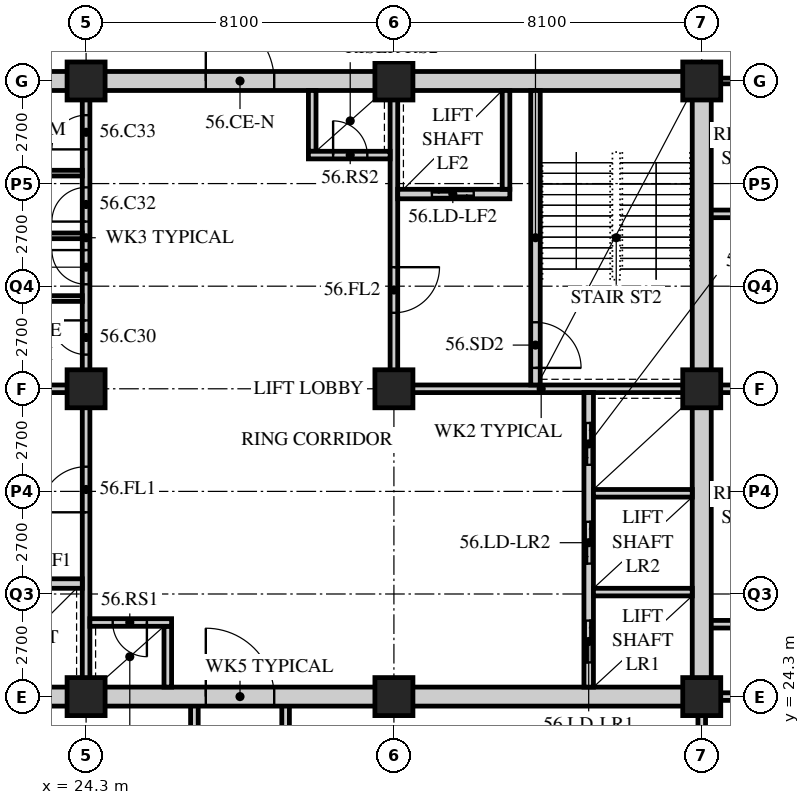
"""IFC4 building model, lengths in metres.
Left out: names, types, materials, properties, quantities, classifications, styles, units other than length and angle.
Written with IfcOpenShell. Run it as: python <this file> out.ifc"""

import sys

from ifc_helpers import new_model, si_unit, direction, frame, frame_2d, origin, origin_2d, place, context, subcontext, project, spatial, rectangle, hollow_rectangle, extrude, element, fill, save


model = new_model("IFC4")
c1 = context("Model", 3, precision=1e-05, world=origin(), true_north=direction((0.0, 1.0)))
c2 = subcontext(c1, "Body", "Model", "MODEL_VIEW")
j1 = project(units=[si_unit("LENGTHUNIT", "METRE"), si_unit("PLANEANGLEUNIT", "RADIAN")], contexts=[c1])
p1 = place(None, origin())
s1 = spatial("IfcSite", under=j1, at=p1, CompositionType="ELEMENT")
p2 = place(p1, origin())
s2 = spatial("IfcBuilding", under=s1, at=p2, CompositionType="ELEMENT")
p3 = place(p2, frame((0.0, 0.0, 217.2)))
s3 = spatial("IfcBuildingStorey", under=s2, at=p3, CompositionType="ELEMENT", Elevation=217.2)
for number, where, z_axis, x_axis in (
    (1, (24.3, 24.3, 0.0), (0.0, 0.0, 1.0), (1.0, 0.0, 0.0)),
    (2, (24.3, 32.4, 0.0), (0.0, 0.0, 1.0), (1.0, 0.0, 0.0)),
    (3, (24.3, 40.5, 0.0), (0.0, 0.0, 1.0), (1.0, 0.0, 0.0)),
    (4, (32.4, 24.3, 0.0), (0.0, 0.0, 1.0), (1.0, 0.0, 0.0)),
    (5, (32.4, 32.4, 0.0), (0.0, 0.0, 1.0), (1.0, 0.0, 0.0)),
    (6, (32.4, 40.5, 0.0), (0.0, 0.0, 1.0), (1.0, 0.0, 0.0)),
    (7, (40.5, 24.3, 0.0), (0.0, 0.0, 1.0), (1.0, 0.0, 0.0)),
    (8, (40.5, 32.4, 0.0), (0.0, 0.0, 1.0), (1.0, 0.0, 0.0)),
    (9, (40.5, 40.5, 0.0), (0.0, 0.0, 1.0), (1.0, 0.0, 0.0)),
):
    element("IfcColumn", number, at=place(p3, frame(where, z_axis=z_axis, x_axis=x_axis)), inside=s3, PredefinedType="COLUMN", context=c2, shape_type="SweptSolid", body=[
        extrude(hollow_rectangle(XDim=1.0, YDim=1.0, WallThickness=0.1, at=origin_2d()), origin(), (0.0, 0.0, 1.0), 3.6),
    ])
p4 = place(p3, frame((46.8, 40.5, 0.0), z_axis=(0.0, 0.0, 1.0), x_axis=(-1.0, 0.0, 0.0)))
e10 = element("IfcWall", 10, at=p4, inside=s3, PredefinedType="PARTITIONING", context=c2, shape_type="SweptSolid", body=[
    extrude(rectangle(XDim=6.1, YDim=0.15, at=frame_2d((3.05, 0.0))), origin(), (0.0, 0.0, 1.0), 3.39),
])
for number, where, z_axis, x_axis in (
    (11, (40.5, 32.4, 0.0), (0.0, 0.0, 1.0), (1.0, 0.0, 0.0)),
    (12, (46.8, 26.205, 0.0), (0.0, 0.0, 1.0), (-1.0, 0.0, 0.0)),
    (13, (46.8, 37.003, 0.0), (0.0, 0.0, 1.0), (-1.0, 0.0, 0.0)),
):
    element("IfcWall", number, at=place(p3, frame(where, z_axis=z_axis, x_axis=x_axis)), inside=s3, PredefinedType="SOLIDWALL", context=c2, shape_type="SweptSolid", body=[
        extrude(rectangle(XDim=6.3, YDim=0.2, at=frame_2d((3.15, 0.0))), origin(), (0.0, 0.0, 1.0), 3.39),
    ])
p5 = place(p3, frame((40.5, 20.7, 0.0), z_axis=(0.0, 0.0, 1.0), x_axis=(0.0, 1.0, 0.0)))
e14 = element("IfcWall", 14, at=p5, inside=s3, PredefinedType="SOLIDWALL", context=c2, shape_type="SweptSolid", body=[
    extrude(rectangle(XDim=3.6, YDim=0.2, at=frame_2d((1.8, 0.0))), origin(), (0.0, 0.0, 1.0), 2.778),
])
for number, where, z_axis, x_axis in (
    (15, (27.15, 20.7, 0.0), (0.0, 0.0, 1.0), (0.0, 1.0, 0.0)),
    (16, (29.55, 20.7, 0.0), (0.0, 0.0, 1.0), (0.0, 1.0, 0.0)),
):
    element("IfcWall", number, at=place(p3, frame(where, z_axis=z_axis, x_axis=x_axis)), inside=s3, PredefinedType="SOLIDWALL", context=c2, shape_type="SweptSolid", body=[
        extrude(rectangle(XDim=3.6, YDim=0.2, at=frame_2d((1.8, 0.0))), origin(), (0.0, 0.0, 1.0), 3.39),
    ])
p6 = place(p3, frame((40.5, 24.3, 0.0), z_axis=(0.0, 0.0, 1.0), x_axis=(1.0, 0.0, 0.0)))
e17 = element("IfcWall", 17, at=p6, inside=s3, PredefinedType="SOLIDWALL", context=c2, shape_type="SweptSolid", body=[
    extrude(rectangle(XDim=6.3, YDim=0.2, at=frame_2d((3.15, 0.0))), origin(), (0.0, 0.0, 1.0), 3.39),
])
p7 = place(p3, frame((15.95, 24.3, 0.0), z_axis=(0.0, 0.0, 1.0), x_axis=(1.0, 0.0, 0.0)))
e18 = element("IfcWall", 18, at=p7, inside=s3, PredefinedType="SOLIDWALL", context=c2, shape_type="SweptSolid", body=[
    extrude(rectangle(XDim=24.8, YDim=0.5, at=frame_2d((12.4, 0.0))), origin(), (0.0, 0.0, 1.0), 2.74),
])
p8 = place(p7, frame((11.5, 0.0, 0.0)))
e19 = element("IfcOpeningElement", 19, at=p8, cuts=e18, PredefinedType="OPENING", context=c2, shape_type="SweptSolid", body=[
    extrude(rectangle(XDim=1.8, YDim=2.4, at=frame_2d((0.9, 1.2))), frame((0.0, 0.26, 0.0), z_axis=(0.0, -1.0, 0.0), x_axis=(1.0, 0.0, 0.0)), (0.0, 0.0, 1.0), 0.52),
])
p9 = place(p3, frame((15.95, 40.5, 0.0), z_axis=(0.0, 0.0, 1.0), x_axis=(1.0, 0.0, 0.0)))
e20 = element("IfcWall", 20, at=p9, inside=s3, PredefinedType="SOLIDWALL", context=c2, shape_type="SweptSolid", body=[
    extrude(rectangle(XDim=24.8, YDim=0.5, at=frame_2d((12.4, 0.0))), origin(), (0.0, 0.0, 1.0), 2.74),
])
p10 = place(p9, frame((11.5, 0.0, 0.0)))
e21 = element("IfcOpeningElement", 21, at=p10, cuts=e20, PredefinedType="OPENING", context=c2, shape_type="SweptSolid", body=[
    extrude(rectangle(XDim=1.8, YDim=2.4, at=frame_2d((0.9, 1.2))), frame((0.0, 0.26, 0.0), z_axis=(0.0, -1.0, 0.0), x_axis=(1.0, 0.0, 0.0)), (0.0, 0.0, 1.0), 0.52),
])
p11 = place(p3, frame((40.5, 24.55, 0.0), z_axis=(0.0, 0.0, 1.0), x_axis=(0.0, 1.0, 0.0)))
e22 = element("IfcWall", 22, at=p11, inside=s3, PredefinedType="SOLIDWALL", context=c2, shape_type="SweptSolid", body=[
    extrude(rectangle(XDim=15.7, YDim=0.5, at=frame_2d((7.85, 0.0))), origin(), (0.0, 0.0, 1.0), 2.778),
])
p12 = place(p3, frame((16.45, 32.4, 0.0), z_axis=(0.0, 0.0, 1.0), x_axis=(1.0, 0.0, 0.0)))
e23 = element("IfcWall", 23, at=p12, inside=s3, PredefinedType="SOLIDWALL", context=c2, shape_type="SweptSolid", body=[
    extrude(rectangle(XDim=7.95, YDim=0.2, at=frame_2d((3.975, 0.0))), origin(), (0.0, 0.0, 1.0), 2.778),
])
p13 = place(p3, frame((24.3, 24.55, 0.0), z_axis=(0.0, 0.0, 1.0), x_axis=(0.0, 1.0, 0.0)))
e24 = element("IfcWall", 24, at=p13, inside=s3, PredefinedType="SOLIDWALL", context=c2, shape_type="SweptSolid", body=[
    extrude(rectangle(XDim=7.75, YDim=0.2, at=frame_2d((3.875, 0.0))), origin(), (0.0, 0.0, 1.0), 2.778),
])
p14 = place(p13, frame((4.6, 0.0, 0.0)))
e25 = element("IfcOpeningElement", 25, at=p14, cuts=e24, PredefinedType="OPENING", context=c2, shape_type="SweptSolid", body=[
    extrude(rectangle(XDim=1.2, YDim=2.1, at=frame_2d((0.6, 1.05))), frame((0.0, 0.11, 0.0), z_axis=(0.0, -1.0, 0.0), x_axis=(1.0, 0.0, 0.0)), (0.0, 0.0, 1.0), 0.22),
])
p15 = place(p3, frame((21.25, 27.275, 0.0), z_axis=(0.0, 0.0, 1.0), x_axis=(1.0, 0.0, 0.0)))
e26 = element("IfcWall", 26, at=p15, inside=s3, PredefinedType="SOLIDWALL", context=c2, shape_type="SweptSolid", body=[
    extrude(rectangle(XDim=2.95, YDim=0.25, at=frame_2d((1.475, 0.0))), origin(), (0.0, 0.0, 1.0), 3.39),
])
p16 = place(p15, frame((0.95, 0.0, 0.0)))
e27 = element("IfcOpeningElement", 27, at=p16, cuts=e26, PredefinedType="OPENING", context=c2, shape_type="SweptSolid", body=[
    extrude(rectangle(XDim=1.1, YDim=2.4, at=frame_2d((0.55, 1.2))), frame((0.0, 0.135, 0.0), z_axis=(0.0, -1.0, 0.0), x_axis=(1.0, 0.0, 0.0)), (0.0, 0.0, 1.0), 0.27),
])
p17 = place(p3, frame((26.45, 24.55, 0.0), z_axis=(0.0, 0.0, 1.0), x_axis=(0.0, 1.0, 0.0)))
e28 = element("IfcWall", 28, at=p17, inside=s3, PredefinedType="SOLIDWALL", context=c2, shape_type="SweptSolid", body=[
    extrude(rectangle(XDim=1.6, YDim=0.2, at=frame_2d((0.8, 0.0))), origin(), (0.0, 0.0, 1.0), 3.39),
])
p18 = place(p3, frame((24.4, 26.25, 0.0), z_axis=(0.0, 0.0, 1.0), x_axis=(1.0, 0.0, 0.0)))
e29 = element("IfcWall", 29, at=p18, inside=s3, PredefinedType="SOLIDWALL", context=c2, shape_type="SweptSolid", body=[
    extrude(rectangle(XDim=2.15, YDim=0.2, at=frame_2d((1.075, 0.0))), origin(), (0.0, 0.0, 1.0), 3.39),
])
p19 = place(p18, frame((0.6, 0.0, 0.0)))
e30 = element("IfcOpeningElement", 30, at=p19, cuts=e29, PredefinedType="OPENING", context=c2, shape_type="SweptSolid", body=[
    extrude(rectangle(XDim=0.9, YDim=2.1, at=frame_2d((0.45, 1.05))), frame((0.0, 0.11, 0.0), z_axis=(0.0, -1.0, 0.0), x_axis=(1.0, 0.0, 0.0)), (0.0, 0.0, 1.0), 0.22),
])
p20 = place(p3, frame((32.3, 32.4, 0.0), z_axis=(0.0, 0.0, 1.0), x_axis=(1.0, 0.0, 0.0)))
e31 = element("IfcWall", 31, at=p20, inside=s3, PredefinedType="SOLIDWALL", context=c2, shape_type="SweptSolid", body=[
    extrude(rectangle(XDim=7.95, YDim=0.2, at=frame_2d((3.975, 0.0))), origin(), (0.0, 0.0, 1.0), 2.778),
])
p21 = place(p3, frame((32.4, 32.5, 0.0), z_axis=(0.0, 0.0, 1.0), x_axis=(0.0, 1.0, 0.0)))
e32 = element("IfcWall", 32, at=p21, inside=s3, PredefinedType="SOLIDWALL", context=c2, shape_type="SweptSolid", body=[
    extrude(rectangle(XDim=7.75, YDim=0.2, at=frame_2d((3.875, 0.0))), origin(), (0.0, 0.0, 1.0), 2.778),
])
p22 = place(p21, frame((1.9, 0.0, 0.0)))
e33 = element("IfcOpeningElement", 33, at=p22, cuts=e32, PredefinedType="OPENING", context=c2, shape_type="SweptSolid", body=[
    extrude(rectangle(XDim=1.2, YDim=2.1, at=frame_2d((0.6, 1.05))), frame((0.0, 0.11, 0.0), z_axis=(0.0, -1.0, 0.0), x_axis=(1.0, 0.0, 0.0)), (0.0, 0.0, 1.0), 0.22),
])
p23 = place(p3, frame((37.525, 24.55, 0.0), z_axis=(0.0, 0.0, 1.0), x_axis=(0.0, 1.0, 0.0)))
e34 = element("IfcWall", 34, at=p23, inside=s3, PredefinedType="SOLIDWALL", context=c2, shape_type="SweptSolid", body=[
    extrude(rectangle(XDim=7.75, YDim=0.25, at=frame_2d((3.875, 0.0))), origin(), (0.0, 0.0, 1.0), 3.39),
])
p24 = place(p23, frame((0.65, 0.0, 0.0)))
e35 = element("IfcOpeningElement", 35, at=p24, cuts=e34, PredefinedType="OPENING", context=c2, shape_type="SweptSolid", body=[
    extrude(rectangle(XDim=1.1, YDim=2.4, at=frame_2d((0.55, 1.2))), frame((0.0, 0.135, 0.0), z_axis=(0.0, -1.0, 0.0), x_axis=(1.0, 0.0, 0.0)), (0.0, 0.0, 1.0), 0.27),
])
p25 = place(p23, frame((3.25, 0.0, 0.0)))
e36 = element("IfcOpeningElement", 36, at=p25, cuts=e34, PredefinedType="OPENING", context=c2, shape_type="SweptSolid", body=[
    extrude(rectangle(XDim=1.1, YDim=2.4, at=frame_2d((0.55, 1.2))), frame((0.0, 0.135, 0.0), z_axis=(0.0, -1.0, 0.0), x_axis=(1.0, 0.0, 0.0)), (0.0, 0.0, 1.0), 0.27),
])
p26 = place(p23, frame((5.85, 0.0, 0.0)))
e37 = element("IfcOpeningElement", 37, at=p26, cuts=e34, PredefinedType="OPENING", context=c2, shape_type="SweptSolid", body=[
    extrude(rectangle(XDim=1.1, YDim=2.4, at=frame_2d((0.55, 1.2))), frame((0.0, 0.135, 0.0), z_axis=(0.0, -1.0, 0.0), x_axis=(1.0, 0.0, 0.0)), (0.0, 0.0, 1.0), 0.27),
])
for number, where, z_axis, x_axis in (
    (38, (37.65, 27.05, 0.0), (0.0, 0.0, 1.0), (1.0, 0.0, 0.0)),
    (39, (37.65, 29.65, 0.0), (0.0, 0.0, 1.0), (1.0, 0.0, 0.0)),
):
    element("IfcWall", number, at=place(p3, frame(where, z_axis=z_axis, x_axis=x_axis)), inside=s3, PredefinedType="SOLIDWALL", context=c2, shape_type="SweptSolid", body=[
        extrude(rectangle(XDim=2.6, YDim=0.2, at=frame_2d((1.3, 0.0))), origin(), (0.0, 0.0, 1.0), 3.39),
    ])
p27 = place(p3, frame((36.125, 32.5, 0.0), z_axis=(0.0, 0.0, 1.0), x_axis=(0.0, 1.0, 0.0)))
e40 = element("IfcWall", 40, at=p27, inside=s3, PredefinedType="SOLIDWALL", context=c2, shape_type="SweptSolid", body=[
    extrude(rectangle(XDim=7.75, YDim=0.25, at=frame_2d((3.875, 0.0))), origin(), (0.0, 0.0, 1.0), 3.39),
])
p28 = place(p27, frame((0.45, 0.0, 0.0)))
e41 = element("IfcOpeningElement", 41, at=p28, cuts=e40, PredefinedType="OPENING", context=c2, shape_type="SweptSolid", body=[
    extrude(rectangle(XDim=1.2, YDim=2.1, at=frame_2d((0.6, 1.05))), frame((0.0, 0.135, 0.0), z_axis=(0.0, -1.0, 0.0), x_axis=(1.0, 0.0, 0.0)), (0.0, 0.0, 1.0), 0.27),
])
p29 = place(p3, frame((32.5, 37.525, 0.0), z_axis=(0.0, 0.0, 1.0), x_axis=(1.0, 0.0, 0.0)))
e42 = element("IfcWall", 42, at=p29, inside=s3, PredefinedType="SOLIDWALL", context=c2, shape_type="SweptSolid", body=[
    extrude(rectangle(XDim=2.95, YDim=0.25, at=frame_2d((1.475, 0.0))), origin(), (0.0, 0.0, 1.0), 3.39),
])
p30 = place(p29, frame((0.9, 0.0, 0.0)))
e43 = element("IfcOpeningElement", 43, at=p30, cuts=e42, PredefinedType="OPENING", context=c2, shape_type="SweptSolid", body=[
    extrude(rectangle(XDim=1.1, YDim=2.4, at=frame_2d((0.55, 1.2))), frame((0.0, 0.135, 0.0), z_axis=(0.0, -1.0, 0.0), x_axis=(1.0, 0.0, 0.0)), (0.0, 0.0, 1.0), 0.27),
])
p31 = place(p3, frame((35.35, 37.65, 0.0), z_axis=(0.0, 0.0, 1.0), x_axis=(0.0, 1.0, 0.0)))
e44 = element("IfcWall", 44, at=p31, inside=s3, PredefinedType="SOLIDWALL", context=c2, shape_type="SweptSolid", body=[
    extrude(rectangle(XDim=2.6, YDim=0.2, at=frame_2d((1.3, 0.0))), origin(), (0.0, 0.0, 1.0), 3.39),
])
p32 = place(p3, frame((30.25, 38.65, 0.0), z_axis=(0.0, 0.0, 1.0), x_axis=(0.0, 1.0, 0.0)))
e45 = element("IfcWall", 45, at=p32, inside=s3, PredefinedType="SOLIDWALL", context=c2, shape_type="SweptSolid", body=[
    extrude(rectangle(XDim=1.6, YDim=0.2, at=frame_2d((0.8, 0.0))), origin(), (0.0, 0.0, 1.0), 3.39),
])
p33 = place(p3, frame((30.15, 38.55, 0.0), z_axis=(0.0, 0.0, 1.0), x_axis=(1.0, 0.0, 0.0)))
e46 = element("IfcWall", 46, at=p33, inside=s3, PredefinedType="SOLIDWALL", context=c2, shape_type="SweptSolid", body=[
    extrude(rectangle(XDim=2.15, YDim=0.2, at=frame_2d((1.075, 0.0))), origin(), (0.0, 0.0, 1.0), 3.39),
])
p34 = place(p33, frame((0.65, 0.0, 0.0)))
e47 = element("IfcOpeningElement", 47, at=p34, cuts=e46, PredefinedType="OPENING", context=c2, shape_type="SweptSolid", body=[
    extrude(rectangle(XDim=0.9, YDim=2.1, at=frame_2d((0.45, 1.05))), frame((0.0, 0.11, 0.0), z_axis=(0.0, -1.0, 0.0), x_axis=(1.0, 0.0, 0.0)), (0.0, 0.0, 1.0), 0.22),
])
p35 = place(p3, frame((24.3, 32.5, 0.0), z_axis=(0.0, 0.0, 1.0), x_axis=(0.0, 1.0, 0.0)))
e48 = element("IfcWall", 48, at=p35, inside=s3, PredefinedType="PARTITIONING", context=c2, shape_type="SweptSolid", body=[
    extrude(rectangle(XDim=7.75, YDim=0.2, at=frame_2d((3.875, 0.0))), origin(), (0.0, 0.0, 1.0), 2.778),
])
p36 = place(p35, frame((0.8, 0.0, 0.0)))
e49 = element("IfcOpeningElement", 49, at=p36, cuts=e48, PredefinedType="OPENING", context=c2, shape_type="SweptSolid", body=[
    extrude(rectangle(XDim=0.9, YDim=2.1, at=frame_2d((0.45, 1.05))), frame((0.0, 0.11, 0.0), z_axis=(0.0, -1.0, 0.0), x_axis=(1.0, 0.0, 0.0)), (0.0, 0.0, 1.0), 0.22),
])
p37 = place(p35, frame((2.65, 0.0, 0.0)))
e50 = element("IfcOpeningElement", 50, at=p37, cuts=e48, PredefinedType="OPENING", context=c2, shape_type="SweptSolid", body=[
    extrude(rectangle(XDim=0.9, YDim=2.1, at=frame_2d((0.45, 1.05))), frame((0.0, 0.11, 0.0), z_axis=(0.0, -1.0, 0.0), x_axis=(1.0, 0.0, 0.0)), (0.0, 0.0, 1.0), 0.22),
])
p38 = place(p35, frame((4.3, 0.0, 0.0)))
e51 = element("IfcOpeningElement", 51, at=p38, cuts=e48, PredefinedType="OPENING", context=c2, shape_type="SweptSolid", body=[
    extrude(rectangle(XDim=0.9, YDim=2.1, at=frame_2d((0.45, 1.05))), frame((0.0, 0.11, 0.0), z_axis=(0.0, -1.0, 0.0), x_axis=(1.0, 0.0, 0.0)), (0.0, 0.0, 1.0), 0.22),
])
p39 = place(p35, frame((6.2, 0.0, 0.0)))
e52 = element("IfcOpeningElement", 52, at=p39, cuts=e48, PredefinedType="OPENING", context=c2, shape_type="SweptSolid", body=[
    extrude(rectangle(XDim=0.9, YDim=2.1, at=frame_2d((0.45, 1.05))), frame((0.0, 0.11, 0.0), z_axis=(0.0, -1.0, 0.0), x_axis=(1.0, 0.0, 0.0)), (0.0, 0.0, 1.0), 0.22),
])
for number, where, z_axis, x_axis in (
    (53, (21.05, 34.775, 0.0), (0.0, 0.0, 1.0), (1.0, 0.0, 0.0)),
    (54, (21.05, 36.425, 0.0), (0.0, 0.0, 1.0), (1.0, 0.0, 0.0)),
):
    element("IfcWall", number, at=place(p3, frame(where, z_axis=z_axis, x_axis=x_axis)), inside=s3, PredefinedType="PARTITIONING", context=c2, shape_type="SweptSolid", body=[
        extrude(rectangle(XDim=3.15, YDim=0.15, at=frame_2d((1.575, 0.0))), origin(), (0.0, 0.0, 1.0), 3.39),
    ])
p40 = place(p3, frame((21.2, 38.075, 0.0), z_axis=(0.0, 0.0, 1.0), x_axis=(1.0, 0.0, 0.0)))
e55 = element("IfcWall", 55, at=p40, inside=s3, PredefinedType="PARTITIONING", context=c2, shape_type="SweptSolid", body=[
    extrude(rectangle(XDim=3.0, YDim=0.15, at=frame_2d((1.5, 0.0))), origin(), (0.0, 0.0, 1.0), 3.39),
])
p41 = place(p36, origin())
e56 = element("IfcDoor", 56, at=p41, inside=s3, OperationType="SINGLE_SWING_RIGHT", PredefinedType="DOOR", context=c2, shape_type="SweptSolid", body=[
    extrude(rectangle(XDim=0.9, YDim=2.1, at=frame_2d((0.45, 1.05))), frame((0.0, 0.025, 0.0), z_axis=(0.0, -1.0, 0.0), x_axis=(1.0, 0.0, 0.0)), (0.0, 0.0, 1.0), 0.05),
])
fill(e49, e56)
p42 = place(p37, origin())
e57 = element("IfcDoor", 57, at=p42, inside=s3, OperationType="SINGLE_SWING_RIGHT", PredefinedType="DOOR", context=c2, shape_type="SweptSolid", body=[
    extrude(rectangle(XDim=0.9, YDim=2.1, at=frame_2d((0.45, 1.05))), frame((0.0, 0.025, 0.0), z_axis=(0.0, -1.0, 0.0), x_axis=(1.0, 0.0, 0.0)), (0.0, 0.0, 1.0), 0.05),
])
fill(e50, e57)
p43 = place(p38, origin())
e58 = element("IfcDoor", 58, at=p43, inside=s3, OperationType="SINGLE_SWING_LEFT", PredefinedType="DOOR", context=c2, shape_type="SweptSolid", body=[
    extrude(rectangle(XDim=0.9, YDim=2.1, at=frame_2d((0.45, 1.05))), frame((0.0, 0.025, 0.0), z_axis=(0.0, -1.0, 0.0), x_axis=(1.0, 0.0, 0.0)), (0.0, 0.0, 1.0), 0.05),
])
fill(e51, e58)
p44 = place(p39, origin())
e59 = element("IfcDoor", 59, at=p44, inside=s3, OperationType="SINGLE_SWING_LEFT", PredefinedType="DOOR", context=c2, shape_type="SweptSolid", body=[
    extrude(rectangle(XDim=0.9, YDim=2.1, at=frame_2d((0.45, 1.05))), frame((0.0, 0.025, 0.0), z_axis=(0.0, -1.0, 0.0), x_axis=(1.0, 0.0, 0.0)), (0.0, 0.0, 1.0), 0.05),
])
fill(e52, e59)
p45 = place(p14, origin())
e60 = element("IfcDoor", 60, at=p45, inside=s3, OperationType="SINGLE_SWING_LEFT", PredefinedType="DOOR", context=c2, shape_type="SweptSolid", body=[
    extrude(rectangle(XDim=1.2, YDim=2.1, at=frame_2d((0.6, 1.05))), frame((0.0, 0.025, 0.0), z_axis=(0.0, -1.0, 0.0), x_axis=(1.0, 0.0, 0.0)), (0.0, 0.0, 1.0), 0.05),
])
fill(e25, e60)
p46 = place(p19, origin())
e61 = element("IfcDoor", 61, at=p46, inside=s3, OperationType="SINGLE_SWING_LEFT", PredefinedType="DOOR", context=c2, shape_type="SweptSolid", body=[
    extrude(rectangle(XDim=0.9, YDim=2.1, at=frame_2d((0.45, 1.05))), frame((0.0, 0.025, 0.0), z_axis=(0.0, -1.0, 0.0), x_axis=(1.0, 0.0, 0.0)), (0.0, 0.0, 1.0), 0.05),
])
fill(e30, e61)
p47 = place(p28, origin())
e62 = element("IfcDoor", 62, at=p47, inside=s3, OperationType="SINGLE_SWING_RIGHT", PredefinedType="DOOR", context=c2, shape_type="SweptSolid", body=[
    extrude(rectangle(XDim=1.2, YDim=2.1, at=frame_2d((0.6, 1.05))), frame((0.0, 0.025, 0.0), z_axis=(0.0, -1.0, 0.0), x_axis=(1.0, 0.0, 0.0)), (0.0, 0.0, 1.0), 0.05),
])
fill(e41, e62)
p48 = place(p22, origin())
e63 = element("IfcDoor", 63, at=p48, inside=s3, OperationType="SINGLE_SWING_LEFT", PredefinedType="DOOR", context=c2, shape_type="SweptSolid", body=[
    extrude(rectangle(XDim=1.2, YDim=2.1, at=frame_2d((0.6, 1.05))), frame((0.0, 0.025, 0.0), z_axis=(0.0, -1.0, 0.0), x_axis=(1.0, 0.0, 0.0)), (0.0, 0.0, 1.0), 0.05),
])
fill(e33, e63)
p49 = place(p34, origin())
e64 = element("IfcDoor", 64, at=p49, inside=s3, OperationType="SINGLE_SWING_LEFT", PredefinedType="DOOR", context=c2, shape_type="SweptSolid", body=[
    extrude(rectangle(XDim=0.9, YDim=2.1, at=frame_2d((0.45, 1.05))), frame((0.0, 0.025, 0.0), z_axis=(0.0, -1.0, 0.0), x_axis=(1.0, 0.0, 0.0)), (0.0, 0.0, 1.0), 0.05),
])
fill(e47, e64)
p50 = place(p24, origin())
e65 = element("IfcDoor", 65, at=p50, inside=s3, OperationType="DOUBLE_DOOR_SLIDING", PredefinedType="DOOR", context=c2, shape_type="SweptSolid", body=[
    extrude(rectangle(XDim=1.1, YDim=2.4, at=frame_2d((0.55, 1.2))), frame((0.0, 0.025, 0.0), z_axis=(0.0, -1.0, 0.0), x_axis=(1.0, 0.0, 0.0)), (0.0, 0.0, 1.0), 0.05),
])
fill(e35, e65)
p51 = place(p25, origin())
e66 = element("IfcDoor", 66, at=p51, inside=s3, OperationType="DOUBLE_DOOR_SLIDING", PredefinedType="DOOR", context=c2, shape_type="SweptSolid", body=[
    extrude(rectangle(XDim=1.1, YDim=2.4, at=frame_2d((0.55, 1.2))), frame((0.0, 0.025, 0.0), z_axis=(0.0, -1.0, 0.0), x_axis=(1.0, 0.0, 0.0)), (0.0, 0.0, 1.0), 0.05),
])
fill(e36, e66)
p52 = place(p26, origin())
e67 = element("IfcDoor", 67, at=p52, inside=s3, OperationType="DOUBLE_DOOR_SLIDING", PredefinedType="DOOR", context=c2, shape_type="SweptSolid", body=[
    extrude(rectangle(XDim=1.1, YDim=2.4, at=frame_2d((0.55, 1.2))), frame((0.0, 0.025, 0.0), z_axis=(0.0, -1.0, 0.0), x_axis=(1.0, 0.0, 0.0)), (0.0, 0.0, 1.0), 0.05),
])
fill(e37, e67)
p53 = place(p30, origin())
e68 = element("IfcDoor", 68, at=p53, inside=s3, OperationType="DOUBLE_DOOR_SLIDING", PredefinedType="DOOR", context=c2, shape_type="SweptSolid", body=[
    extrude(rectangle(XDim=1.1, YDim=2.4, at=frame_2d((0.55, 1.2))), frame((0.0, 0.025, 0.0), z_axis=(0.0, -1.0, 0.0), x_axis=(1.0, 0.0, 0.0)), (0.0, 0.0, 1.0), 0.05),
])
fill(e43, e68)
p54 = place(p8, origin())
e69 = element("IfcDoor", 69, at=p54, inside=s3, OperationType="DOUBLE_DOOR_SINGLE_SWING", PredefinedType="DOOR", context=c2, shape_type="SweptSolid", body=[
    extrude(rectangle(XDim=1.8, YDim=2.4, at=frame_2d((0.9, 1.2))), frame((0.0, 0.025, 0.0), z_axis=(0.0, -1.0, 0.0), x_axis=(1.0, 0.0, 0.0)), (0.0, 0.0, 1.0), 0.05),
])
fill(e19, e69)
p55 = place(p10, origin())
e70 = element("IfcDoor", 70, at=p55, inside=s3, OperationType="DOUBLE_DOOR_SINGLE_SWING", PredefinedType="DOOR", context=c2, shape_type="SweptSolid", body=[
    extrude(rectangle(XDim=1.8, YDim=2.4, at=frame_2d((0.9, 1.2))), frame((0.0, 0.025, 0.0), z_axis=(0.0, -1.0, 0.0), x_axis=(1.0, 0.0, 0.0)), (0.0, 0.0, 1.0), 0.05),
])
fill(e21, e70)
save(model, sys.argv[1])
